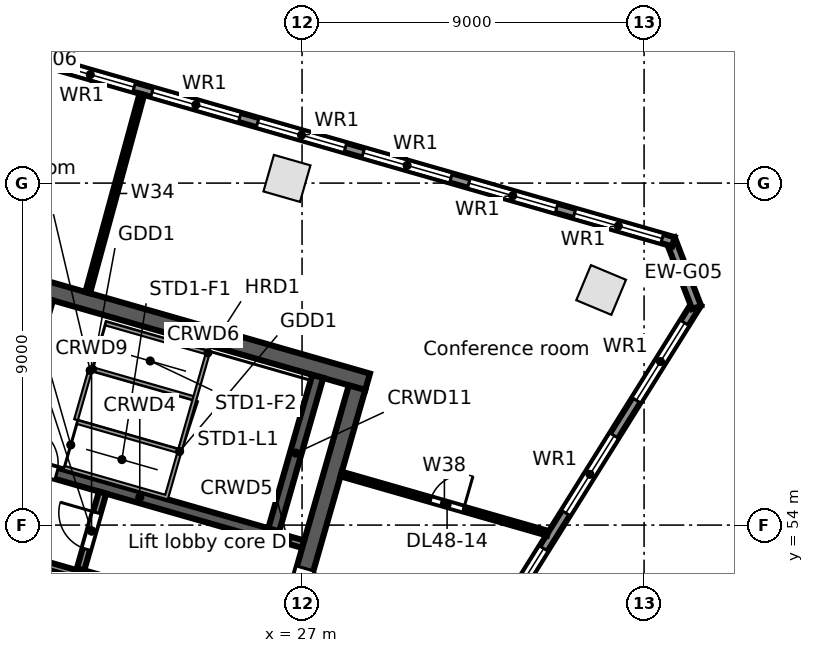
"""IFC4 building model, lengths in metres.
Left out: names, types, materials, properties, quantities, classifications, styles, units other than length and angle.
Written with IfcOpenShell. Run it as: python <this file> out.ifc"""

import sys

from ifc_helpers import new_model, si_unit, direction, frame, frame_2d, origin, origin_2d, place, context, subcontext, project, spatial, rectangle, extrude, element, fill, save


model = new_model("IFC4")
c1 = context("Model", 3, precision=1e-05, world=origin(), true_north=direction((0.0, 1.0)))
c2 = subcontext(c1, "Body", "Model", "MODEL_VIEW")
j1 = project(units=[si_unit("LENGTHUNIT", "METRE"), si_unit("PLANEANGLEUNIT", "RADIAN")], contexts=[c1])
p1 = place(None, origin())
s1 = spatial("IfcSite", under=j1, at=p1, CompositionType="ELEMENT")
p2 = place(p1, origin())
s2 = spatial("IfcBuilding", under=s1, at=p2, CompositionType="ELEMENT")
p3 = place(p2, frame((0.0, 0.0, 219.2)))
s3 = spatial("IfcBuildingStorey", under=s2, at=p3, CompositionType="ELEMENT", Elevation=219.2)
for number, where, z_axis, x_axis in (
    (1, (26.603, 63.124, 0.0), (0.0, 0.0, 1.0), (-0.961, 0.276, 0.0)),
    (2, (34.87, 60.187, 0.0), (0.0, 0.0, 1.0), (-0.923, 0.385, 0.0)),
):
    element("IfcColumn", number, at=place(p3, frame(where, z_axis=z_axis, x_axis=x_axis)), inside=s3, PredefinedType="COLUMN", context=c2, shape_type="SweptSolid", body=[
        extrude(rectangle(XDim=1.0, YDim=1.0, at=origin_2d()), origin(), (0.0, 0.0, 1.0), 3.9),
    ])
p4 = place(p3, frame((37.392, 59.84, 0.0), z_axis=(0.0, 0.0, 1.0), x_axis=(-0.529919909431, -0.848047692992, 0.0)))
e3 = element("IfcWall", 3, at=p4, inside=s3, PredefinedType="STANDARD", context=c2, shape_type="SweptSolid", body=[
    extrude(rectangle(XDim=21.104, YDim=0.25, at=frame_2d((10.552, 0.0))), origin(), (0.0, 0.0, 1.0), 3.62),
])
p5 = place(p4, frame((18.112, 0.0, 0.8)))
e4 = element("IfcOpeningElement", 4, at=p5, cuts=e3, PredefinedType="OPENING", context=c2, shape_type="SweptSolid", body=[
    extrude(rectangle(XDim=2.4, YDim=2.2, at=frame_2d((1.2, 1.1))), frame((0.0, 0.135, 0.0), z_axis=(0.0, -1.0, 0.0), x_axis=(1.0, 0.0, 0.0)), (0.0, 0.0, 1.0), 0.27),
])
p6 = place(p4, frame((14.612, 0.0, 0.8)))
e5 = element("IfcOpeningElement", 5, at=p6, cuts=e3, PredefinedType="OPENING", context=c2, shape_type="SweptSolid", body=[
    extrude(rectangle(XDim=2.4, YDim=2.2, at=frame_2d((1.2, 1.1))), frame((0.0, 0.135, 0.0), z_axis=(0.0, -1.0, 0.0), x_axis=(1.0, 0.0, 0.0)), (0.0, 0.0, 1.0), 0.27),
])
p7 = place(p4, frame((11.112, 0.0, 0.8)))
e6 = element("IfcOpeningElement", 6, at=p7, cuts=e3, PredefinedType="OPENING", context=c2, shape_type="SweptSolid", body=[
    extrude(rectangle(XDim=2.4, YDim=2.2, at=frame_2d((1.2, 1.1))), frame((0.0, 0.135, 0.0), z_axis=(0.0, -1.0, 0.0), x_axis=(1.0, 0.0, 0.0)), (0.0, 0.0, 1.0), 0.27),
])
p8 = place(p4, frame((7.612, 0.0, 0.8)))
e7 = element("IfcOpeningElement", 7, at=p8, cuts=e3, PredefinedType="OPENING", context=c2, shape_type="SweptSolid", body=[
    extrude(rectangle(XDim=2.4, YDim=2.2, at=frame_2d((1.2, 1.1))), frame((0.0, 0.135, 0.0), z_axis=(0.0, -1.0, 0.0), x_axis=(1.0, 0.0, 0.0)), (0.0, 0.0, 1.0), 0.27),
])
p9 = place(p4, frame((4.112, 0.0, 0.8)))
e8 = element("IfcOpeningElement", 8, at=p9, cuts=e3, PredefinedType="OPENING", context=c2, shape_type="SweptSolid", body=[
    extrude(rectangle(XDim=2.4, YDim=2.2, at=frame_2d((1.2, 1.1))), frame((0.0, 0.135, 0.0), z_axis=(0.0, -1.0, 0.0), x_axis=(1.0, 0.0, 0.0)), (0.0, 0.0, 1.0), 0.27),
])
p10 = place(p4, frame((0.612, 0.0, 0.8)))
e9 = element("IfcOpeningElement", 9, at=p10, cuts=e3, PredefinedType="OPENING", context=c2, shape_type="SweptSolid", body=[
    extrude(rectangle(XDim=2.4, YDim=2.2, at=frame_2d((1.2, 1.1))), frame((0.0, 0.135, 0.0), z_axis=(0.0, -1.0, 0.0), x_axis=(1.0, 0.0, 0.0)), (0.0, 0.0, 1.0), 0.27),
])
p11 = place(p3, frame((36.69, 61.531, 0.0), z_axis=(0.0, 0.0, 1.0), x_axis=(0.358377147136, -0.933576895821, 0.0)))
e10 = element("IfcWall", 10, at=p11, inside=s3, PredefinedType="STANDARD", context=c2, shape_type="SweptSolid", body=[
    extrude(rectangle(XDim=1.93, YDim=0.25, at=frame_2d((0.965, 0.0))), origin(), (0.0, 0.0, 1.0), 3.62),
])
p12 = place(p3, frame((3.34, 71.042, 0.0), z_axis=(0.0, 0.0, 1.0), x_axis=(0.96126179431, -0.275637012753, 0.0)))
e11 = element("IfcWall", 11, at=p12, inside=s3, PredefinedType="STANDARD", context=c2, shape_type="SweptSolid", body=[
    extrude(rectangle(XDim=34.779, YDim=0.25, at=frame_2d((17.39, 0.0))), origin(), (0.0, 0.0, 1.0), 3.62),
])
p13 = place(p12, frame((32.071, 0.0, 0.8)))
e12 = element("IfcOpeningElement", 12, at=p13, cuts=e11, PredefinedType="OPENING", context=c2, shape_type="SweptSolid", body=[
    extrude(rectangle(XDim=2.4, YDim=2.2, at=frame_2d((1.2, 1.1))), frame((0.0, 0.135, 0.0), z_axis=(0.0, -1.0, 0.0), x_axis=(1.0, 0.0, 0.0)), (0.0, 0.0, 1.0), 0.27),
])
p14 = place(p12, frame((29.18, 0.0, 0.8)))
e13 = element("IfcOpeningElement", 13, at=p14, cuts=e11, PredefinedType="OPENING", context=c2, shape_type="SweptSolid", body=[
    extrude(rectangle(XDim=2.4, YDim=2.2, at=frame_2d((1.2, 1.1))), frame((0.0, 0.135, 0.0), z_axis=(0.0, -1.0, 0.0), x_axis=(1.0, 0.0, 0.0)), (0.0, 0.0, 1.0), 0.27),
])
p15 = place(p12, frame((26.289, 0.0, 0.8)))
e14 = element("IfcOpeningElement", 14, at=p15, cuts=e11, PredefinedType="OPENING", context=c2, shape_type="SweptSolid", body=[
    extrude(rectangle(XDim=2.4, YDim=2.2, at=frame_2d((1.2, 1.1))), frame((0.0, 0.135, 0.0), z_axis=(0.0, -1.0, 0.0), x_axis=(1.0, 0.0, 0.0)), (0.0, 0.0, 1.0), 0.27),
])
p16 = place(p12, frame((23.398, 0.0, 0.8)))
e15 = element("IfcOpeningElement", 15, at=p16, cuts=e11, PredefinedType="OPENING", context=c2, shape_type="SweptSolid", body=[
    extrude(rectangle(XDim=2.4, YDim=2.2, at=frame_2d((1.2, 1.1))), frame((0.0, 0.135, 0.0), z_axis=(0.0, -1.0, 0.0), x_axis=(1.0, 0.0, 0.0)), (0.0, 0.0, 1.0), 0.27),
])
p17 = place(p12, frame((20.508, 0.0, 0.8)))
e16 = element("IfcOpeningElement", 16, at=p17, cuts=e11, PredefinedType="OPENING", context=c2, shape_type="SweptSolid", body=[
    extrude(rectangle(XDim=2.4, YDim=2.2, at=frame_2d((1.2, 1.1))), frame((0.0, 0.135, 0.0), z_axis=(0.0, -1.0, 0.0), x_axis=(1.0, 0.0, 0.0)), (0.0, 0.0, 1.0), 0.27),
])
p18 = place(p12, frame((17.616, 0.0, 0.8)))
e17 = element("IfcOpeningElement", 17, at=p18, cuts=e11, PredefinedType="OPENING", context=c2, shape_type="SweptSolid", body=[
    extrude(rectangle(XDim=2.4, YDim=2.2, at=frame_2d((1.2, 1.1))), frame((0.0, 0.135, 0.0), z_axis=(0.0, -1.0, 0.0), x_axis=(1.0, 0.0, 0.0)), (0.0, 0.0, 1.0), 0.27),
])
p19 = place(p12, frame((14.726, 0.0, 0.8)))
e18 = element("IfcOpeningElement", 18, at=p19, cuts=e11, PredefinedType="OPENING", context=c2, shape_type="SweptSolid", body=[
    extrude(rectangle(XDim=2.4, YDim=2.2, at=frame_2d((1.2, 1.1))), frame((0.0, 0.135, 0.0), z_axis=(0.0, -1.0, 0.0), x_axis=(1.0, 0.0, 0.0)), (0.0, 0.0, 1.0), 0.27),
])
p20 = place(p12, frame((11.834, 0.0, 0.8)))
e19 = element("IfcOpeningElement", 19, at=p20, cuts=e11, PredefinedType="OPENING", context=c2, shape_type="SweptSolid", body=[
    extrude(rectangle(XDim=2.4, YDim=2.2, at=frame_2d((1.2, 1.1))), frame((0.0, 0.135, 0.0), z_axis=(0.0, -1.0, 0.0), x_axis=(1.0, 0.0, 0.0)), (0.0, 0.0, 1.0), 0.27),
])
p21 = place(p12, frame((8.944, 0.0, 0.8)))
e20 = element("IfcOpeningElement", 20, at=p21, cuts=e11, PredefinedType="OPENING", context=c2, shape_type="SweptSolid", body=[
    extrude(rectangle(XDim=2.4, YDim=2.2, at=frame_2d((1.2, 1.1))), frame((0.0, 0.135, 0.0), z_axis=(0.0, -1.0, 0.0), x_axis=(1.0, 0.0, 0.0)), (0.0, 0.0, 1.0), 0.27),
])
p22 = place(p12, frame((6.052, 0.0, 0.8)))
e21 = element("IfcOpeningElement", 21, at=p22, cuts=e11, PredefinedType="OPENING", context=c2, shape_type="SweptSolid", body=[
    extrude(rectangle(XDim=2.4, YDim=2.2, at=frame_2d((1.2, 1.1))), frame((0.0, 0.135, 0.0), z_axis=(0.0, -1.0, 0.0), x_axis=(1.0, 0.0, 0.0)), (0.0, 0.0, 1.0), 0.27),
])
p23 = place(p12, frame((3.162, 0.0, 0.8)))
e22 = element("IfcOpeningElement", 22, at=p23, cuts=e11, PredefinedType="OPENING", context=c2, shape_type="SweptSolid", body=[
    extrude(rectangle(XDim=2.4, YDim=2.2, at=frame_2d((1.2, 1.1))), frame((0.0, 0.135, 0.0), z_axis=(0.0, -1.0, 0.0), x_axis=(1.0, 0.0, 0.0)), (0.0, 0.0, 1.0), 0.27),
])
p24 = place(p12, frame((0.271, 0.0, 0.8)))
e23 = element("IfcOpeningElement", 23, at=p24, cuts=e11, PredefinedType="OPENING", context=c2, shape_type="SweptSolid", body=[
    extrude(rectangle(XDim=2.4, YDim=2.2, at=frame_2d((1.2, 1.1))), frame((0.0, 0.135, 0.0), z_axis=(0.0, -1.0, 0.0), x_axis=(1.0, 0.0, 0.0)), (0.0, 0.0, 1.0), 0.27),
])
p25 = place(p3, frame((18.583, 53.423, 0.0), z_axis=(0.0, 0.0, 1.0), x_axis=(0.961259287968, -0.275645753268, 0.0)))
e24 = element("IfcWall", 24, at=p25, inside=s3, PredefinedType="SOLIDWALL", context=c2, shape_type="SweptSolid", body=[
    extrude(rectangle(XDim=2.65, YDim=0.2, at=frame_2d((1.325, 0.0))), origin(), (0.0, 0.0, 1.0), 3.62),
])
p26 = place(p3, frame((21.131, 52.692, 0.0), z_axis=(0.0, 0.0, 1.0), x_axis=(0.961261488075, -0.275638080722, 0.0)))
e25 = element("IfcWall", 25, at=p26, inside=s3, PredefinedType="SOLIDWALL", context=c2, shape_type="SweptSolid", body=[
    extrude(rectangle(XDim=5.45, YDim=0.3, at=frame_2d((2.725, 0.0))), origin(), (0.0, 0.0, 1.0), 3.62),
])
p27 = place(p26, frame((2.35, 0.0, 0.0)))
e26 = element("IfcOpeningElement", 26, at=p27, cuts=e25, PredefinedType="OPENING", context=c2, shape_type="SweptSolid", body=[
    extrude(rectangle(XDim=0.9, YDim=2.1, at=frame_2d((0.45, 1.05))), frame((0.0, 0.16, 0.0), z_axis=(0.0, -1.0, 0.0), x_axis=(1.0, 0.0, 0.0)), (0.0, 0.0, 1.0), 0.32),
])
p28 = place(p3, frame((19.245, 55.73, 0.0), z_axis=(0.0, 0.0, 1.0), x_axis=(0.961263007877, -0.275632780503, 0.0)))
e27 = element("IfcWall", 27, at=p28, inside=s3, PredefinedType="SOLIDWALL", context=c2, shape_type="SweptSolid", body=[
    extrude(rectangle(XDim=7.25, YDim=0.3, at=frame_2d((3.625, 0.0))), origin(), (0.0, 0.0, 1.0), 3.62),
])
p29 = place(p28, frame((0.35, 0.0, 0.0)))
e28 = element("IfcOpeningElement", 28, at=p29, cuts=e27, PredefinedType="OPENING", context=c2, shape_type="SweptSolid", body=[
    extrude(rectangle(XDim=1.0, YDim=2.1, at=frame_2d((0.5, 1.05))), frame((0.0, 0.16, 0.0), z_axis=(0.0, -1.0, 0.0), x_axis=(1.0, 0.0, 0.0)), (0.0, 0.0, 1.0), 0.32),
])
p30 = place(p3, frame((26.214, 53.732, 0.0), z_axis=(0.0, 0.0, 1.0), x_axis=(0.961241665642, -0.275707200184, 0.0)))
e29 = element("IfcWall", 29, at=p30, inside=s3, PredefinedType="SOLIDWALL", context=c2, shape_type="SweptSolid", body=[
    extrude(rectangle(XDim=0.85, YDim=0.2, at=frame_2d((0.425, 0.0))), origin(), (0.0, 0.0, 1.0), 3.62),
])
p31 = place(p3, frame((20.073, 60.252, 0.0), z_axis=(0.0, 0.0, 1.0), x_axis=(0.96126248289, -0.275634611374, 0.0)))
e30 = element("IfcWall", 30, at=p31, inside=s3, PredefinedType="SOLIDWALL", context=c2, shape_type="SweptSolid", body=[
    extrude(rectangle(XDim=9.0, YDim=0.45, at=frame_2d((4.5, 0.0))), origin(), (0.0, 0.0, 1.0), 3.62),
])
p32 = place(p3, frame((17.168, 49.303, 0.0), z_axis=(0.0, 0.0, 1.0), x_axis=(0.275638974822, 0.961261231695, 0.0)))
e31 = element("IfcWall", 31, at=p32, inside=s3, PredefinedType="SOLIDWALL", context=c2, shape_type="SweptSolid", body=[
    extrude(rectangle(XDim=11.1, YDim=0.45, at=frame_2d((5.55, 0.0))), origin(), (0.0, 0.0, 1.0), 3.62),
])
p33 = place(p32, frame((4.95, 0.0, 0.0)))
e32 = element("IfcOpeningElement", 32, at=p33, cuts=e31, PredefinedType="OPENING", context=c2, shape_type="SweptSolid", body=[
    extrude(rectangle(XDim=1.2, YDim=2.1, at=frame_2d((0.6, 1.05))), frame((0.0, 0.235, 0.0), z_axis=(0.0, -1.0, 0.0), x_axis=(1.0, 0.0, 0.0)), (0.0, 0.0, 1.0), 0.47),
])
p34 = place(p3, frame((21.172, 52.837, 0.0), z_axis=(0.0, 0.0, 1.0), x_axis=(0.275657676022, 0.961255868981, 0.0)))
e33 = element("IfcWall", 33, at=p34, inside=s3, PredefinedType="PARTITIONING", context=c2, shape_type="SweptSolid", body=[
    extrude(rectangle(XDim=2.1, YDim=0.2, at=frame_2d((1.05, 0.0))), origin(), (0.0, 0.0, 1.0), 3.62),
])
p35 = place(p34, frame((0.55, 0.0, 0.0)))
e34 = element("IfcOpeningElement", 34, at=p35, cuts=e33, PredefinedType="OPENING", context=c2, shape_type="SweptSolid", body=[
    extrude(rectangle(XDim=1.0, YDim=2.1, at=frame_2d((0.5, 1.05))), frame((0.0, 0.11, 0.0), z_axis=(0.0, -1.0, 0.0), x_axis=(1.0, 0.0, 0.0)), (0.0, 0.0, 1.0), 0.22),
])
p36 = place(p3, frame((26.256, 53.876, 0.0), z_axis=(0.0, 0.0, 1.0), x_axis=(0.275588560745, 0.96127568636, 0.0)))
e35 = element("IfcWall", 35, at=p36, inside=s3, PredefinedType="SOLIDWALL", context=c2, shape_type="SweptSolid", body=[
    extrude(rectangle(XDim=4.2, YDim=0.3, at=frame_2d((2.1, 0.0))), origin(), (0.0, 0.0, 1.0), 3.62),
])
p37 = place(p3, frame((25.387, 46.947, 0.0), z_axis=(0.0, 0.0, 1.0), x_axis=(0.275638974822, 0.961261231695, 0.0)))
e36 = element("IfcWall", 36, at=p37, inside=s3, PredefinedType="SOLIDWALL", context=c2, shape_type="SweptSolid", body=[
    extrude(rectangle(XDim=11.1, YDim=0.45, at=frame_2d((5.55, 0.0))), origin(), (0.0, 0.0, 1.0), 3.62),
])
p38 = place(p37, frame((4.95, 0.0, 0.0)))
e37 = element("IfcOpeningElement", 37, at=p38, cuts=e36, PredefinedType="OPENING", context=c2, shape_type="SweptSolid", body=[
    extrude(rectangle(XDim=1.2, YDim=2.1, at=frame_2d((0.6, 1.05))), frame((0.0, 0.235, 0.0), z_axis=(0.0, -1.0, 0.0), x_axis=(1.0, 0.0, 0.0)), (0.0, 0.0, 1.0), 0.47),
])
p39 = place(p3, frame((21.36, 60.117, 0.0), z_axis=(0.0, 0.0, 1.0), x_axis=(0.263151767798, 0.964754449124, 0.0)))
e38 = element("IfcWall", 38, at=p39, inside=s3, PredefinedType="PARTITIONING", context=c2, shape_type="SweptSolid", body=[
    extrude(rectangle(XDim=5.411, YDim=0.125, at=frame_2d((2.705, 0.0))), origin(), (0.0, 0.0, 1.0), 3.0),
])
p40 = place(p3, frame((28.029, 55.344, 0.0), z_axis=(0.0, 0.0, 1.0), x_axis=(0.961249621014, -0.275679462603, 0.0)))
e39 = element("IfcWall", 39, at=p40, inside=s3, PredefinedType="PARTITIONING", context=c2, shape_type="SweptSolid", body=[
    extrude(rectangle(XDim=5.652, YDim=0.125, at=frame_2d((2.826, 0.0))), origin(), (0.0, 0.0, 1.0), 2.988),
])
p41 = place(p40, frame((2.45, 0.0, 0.0)))
e40 = element("IfcOpeningElement", 40, at=p41, cuts=e39, PredefinedType="OPENING", context=c2, shape_type="SweptSolid", body=[
    extrude(rectangle(XDim=0.9, YDim=2.1, at=frame_2d((0.45, 1.05))), frame((0.0, 0.073, 0.0), z_axis=(0.0, -1.0, 0.0), x_axis=(1.0, 0.0, 0.0)), (0.0, 0.0, 1.0), 0.145),
])
p42 = place(p8, origin())
e41 = element("IfcWindow", 41, at=p42, inside=s3, PartitioningType="SINGLE_PANEL", PredefinedType="WINDOW", context=c2, shape_type="SweptSolid", body=[
    extrude(rectangle(XDim=2.4, YDim=2.2, at=frame_2d((1.2, 1.1))), frame((0.0, 0.03, 0.0), z_axis=(0.0, -1.0, 0.0), x_axis=(1.0, 0.0, 0.0)), (0.0, 0.0, 1.0), 0.06),
])
fill(e7, e41)
p43 = place(p9, origin())
e42 = element("IfcWindow", 42, at=p43, inside=s3, PartitioningType="SINGLE_PANEL", PredefinedType="WINDOW", context=c2, shape_type="SweptSolid", body=[
    extrude(rectangle(XDim=2.4, YDim=2.2, at=frame_2d((1.2, 1.1))), frame((0.0, 0.03, 0.0), z_axis=(0.0, -1.0, 0.0), x_axis=(1.0, 0.0, 0.0)), (0.0, 0.0, 1.0), 0.06),
])
fill(e8, e42)
p44 = place(p10, origin())
e43 = element("IfcWindow", 43, at=p44, inside=s3, PartitioningType="SINGLE_PANEL", PredefinedType="WINDOW", context=c2, shape_type="SweptSolid", body=[
    extrude(rectangle(XDim=2.4, YDim=2.2, at=frame_2d((1.2, 1.1))), frame((0.0, 0.03, 0.0), z_axis=(0.0, -1.0, 0.0), x_axis=(1.0, 0.0, 0.0)), (0.0, 0.0, 1.0), 0.06),
])
fill(e9, e43)
p45 = place(p13, origin())
e44 = element("IfcWindow", 44, at=p45, inside=s3, PartitioningType="SINGLE_PANEL", PredefinedType="WINDOW", context=c2, shape_type="SweptSolid", body=[
    extrude(rectangle(XDim=2.4, YDim=2.2, at=frame_2d((1.2, 1.1))), frame((0.0, 0.03, 0.0), z_axis=(0.0, -1.0, 0.0), x_axis=(1.0, 0.0, 0.0)), (0.0, 0.0, 1.0), 0.06),
])
fill(e12, e44)
p46 = place(p14, origin())
e45 = element("IfcWindow", 45, at=p46, inside=s3, PartitioningType="SINGLE_PANEL", PredefinedType="WINDOW", context=c2, shape_type="SweptSolid", body=[
    extrude(rectangle(XDim=2.4, YDim=2.2, at=frame_2d((1.2, 1.1))), frame((0.0, 0.03, 0.0), z_axis=(0.0, -1.0, 0.0), x_axis=(1.0, 0.0, 0.0)), (0.0, 0.0, 1.0), 0.06),
])
fill(e13, e45)
p47 = place(p15, origin())
e46 = element("IfcWindow", 46, at=p47, inside=s3, PartitioningType="SINGLE_PANEL", PredefinedType="WINDOW", context=c2, shape_type="SweptSolid", body=[
    extrude(rectangle(XDim=2.4, YDim=2.2, at=frame_2d((1.2, 1.1))), frame((0.0, 0.03, 0.0), z_axis=(0.0, -1.0, 0.0), x_axis=(1.0, 0.0, 0.0)), (0.0, 0.0, 1.0), 0.06),
])
fill(e14, e46)
p48 = place(p16, origin())
e47 = element("IfcWindow", 47, at=p48, inside=s3, PartitioningType="SINGLE_PANEL", PredefinedType="WINDOW", context=c2, shape_type="SweptSolid", body=[
    extrude(rectangle(XDim=2.4, YDim=2.2, at=frame_2d((1.2, 1.1))), frame((0.0, 0.03, 0.0), z_axis=(0.0, -1.0, 0.0), x_axis=(1.0, 0.0, 0.0)), (0.0, 0.0, 1.0), 0.06),
])
fill(e15, e47)
p49 = place(p17, origin())
e48 = element("IfcWindow", 48, at=p49, inside=s3, PartitioningType="SINGLE_PANEL", PredefinedType="WINDOW", context=c2, shape_type="SweptSolid", body=[
    extrude(rectangle(XDim=2.4, YDim=2.2, at=frame_2d((1.2, 1.1))), frame((0.0, 0.03, 0.0), z_axis=(0.0, -1.0, 0.0), x_axis=(1.0, 0.0, 0.0)), (0.0, 0.0, 1.0), 0.06),
])
fill(e16, e48)
p50 = place(p18, origin())
e49 = element("IfcWindow", 49, at=p50, inside=s3, PartitioningType="SINGLE_PANEL", PredefinedType="WINDOW", context=c2, shape_type="SweptSolid", body=[
    extrude(rectangle(XDim=2.4, YDim=2.2, at=frame_2d((1.2, 1.1))), frame((0.0, 0.03, 0.0), z_axis=(0.0, -1.0, 0.0), x_axis=(1.0, 0.0, 0.0)), (0.0, 0.0, 1.0), 0.06),
])
fill(e17, e49)
p51 = place(p29, origin())
e50 = element("IfcDoor", 50, at=p51, inside=s3, OperationType="SINGLE_SWING_LEFT", PredefinedType="DOOR", context=c2, shape_type="SweptSolid", body=[
    extrude(rectangle(XDim=1.0, YDim=2.1, at=frame_2d((0.5, 1.05))), frame((0.0, 0.025, 0.0), z_axis=(0.0, -1.0, 0.0), x_axis=(1.0, 0.0, 0.0)), (0.0, 0.0, 1.0), 0.05),
])
fill(e28, e50)
p52 = place(p35, origin())
e51 = element("IfcDoor", 51, at=p52, inside=s3, OperationType="SINGLE_SWING_RIGHT", PredefinedType="DOOR", context=c2, shape_type="SweptSolid", body=[
    extrude(rectangle(XDim=1.0, YDim=2.1, at=frame_2d((0.5, 1.05))), frame((0.0, 0.025, 0.0), z_axis=(0.0, -1.0, 0.0), x_axis=(1.0, 0.0, 0.0)), (0.0, 0.0, 1.0), 0.05),
])
fill(e34, e51)
p53 = place(p38, frame((1.2, 0.0, 0.0), z_axis=(0.0, 0.0, 1.0), x_axis=(-1.0, 0.0, 0.0)))
e52 = element("IfcDoor", 52, at=p53, inside=s3, OperationType="SINGLE_SWING_RIGHT", PredefinedType="DOOR", context=c2, shape_type="SweptSolid", body=[
    extrude(rectangle(XDim=1.2, YDim=2.1, at=frame_2d((0.6, 1.05))), frame((0.0, 0.025, 0.0), z_axis=(0.0, -1.0, 0.0), x_axis=(1.0, 0.0, 0.0)), (0.0, 0.0, 1.0), 0.05),
])
fill(e37, e52)
p54 = place(p41, origin())
e53 = element("IfcDoor", 53, at=p54, inside=s3, OperationType="SINGLE_SWING_RIGHT", PredefinedType="DOOR", context=c2, shape_type="SweptSolid", body=[
    extrude(rectangle(XDim=0.9, YDim=2.1, at=frame_2d((0.45, 1.05))), frame((0.0, 0.025, 0.0), z_axis=(0.0, -1.0, 0.0), x_axis=(1.0, 0.0, 0.0)), (0.0, 0.0, 1.0), 0.05),
])
fill(e40, e53)
save(model, sys.argv[1])
